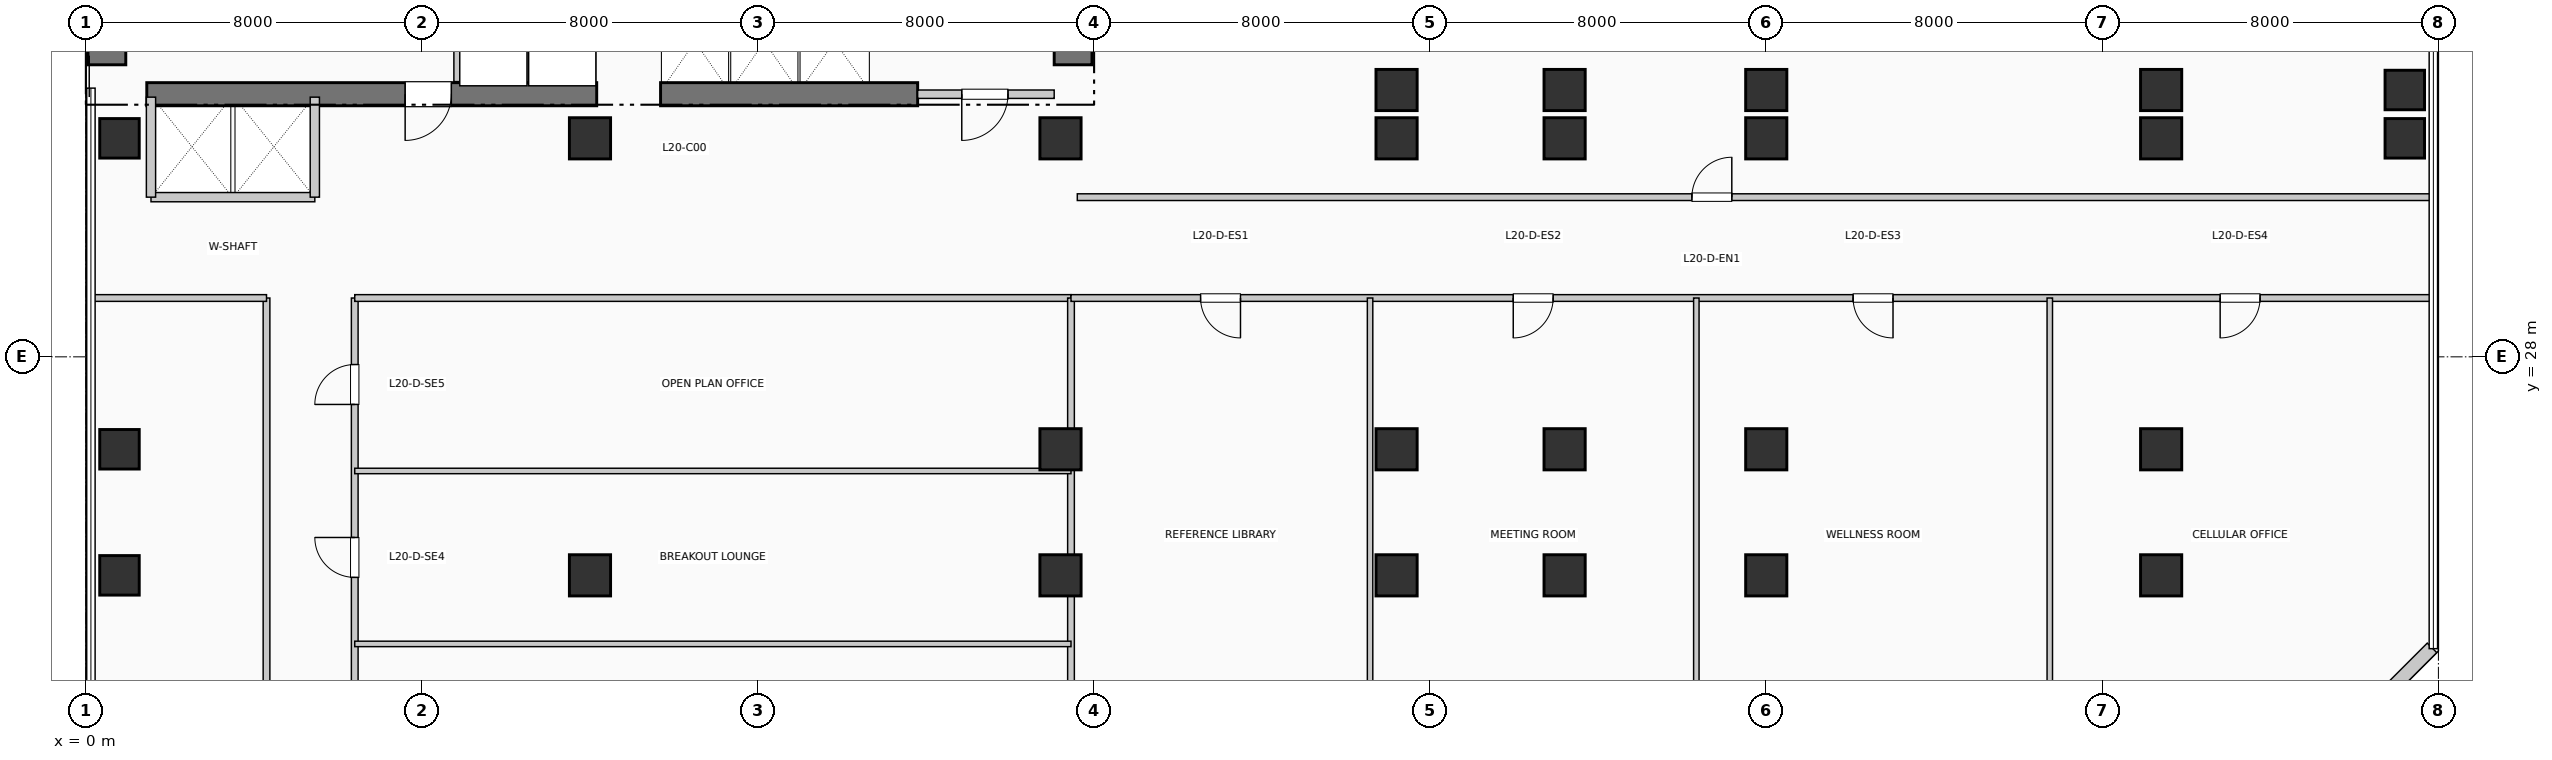
"""IFC4 building model, lengths in metres.
Left out: names, types, materials, properties, quantities, classifications, styles, units other than length and angle.
Written with IfcOpenShell. Run it as: python <this file> out.ifc"""

import sys

from ifc_helpers import new_model, si_unit, direction, frame, frame_2d, origin, origin_2d, place, context, subcontext, project, spatial, rectangle, extrude, element, fill, save


model = new_model("IFC4")
c1 = context("Model", 3, precision=1e-05, world=origin(), true_north=direction((0.0, 1.0)))
c2 = subcontext(c1, "Body", "Model", "MODEL_VIEW")
j1 = project(units=[si_unit("LENGTHUNIT", "METRE"), si_unit("PLANEANGLEUNIT", "RADIAN")], contexts=[c1])
p1 = place(None, origin())
s1 = spatial("IfcSite", under=j1, at=p1, CompositionType="ELEMENT")
p2 = place(p1, origin())
s2 = spatial("IfcBuilding", under=s1, at=p2, CompositionType="ELEMENT")
p3 = place(p2, frame((0.0, 0.0, 85.8)))
s3 = spatial("IfcBuildingStorey", under=s2, at=p3, CompositionType="ELEMENT", Elevation=85.8)
p4 = place(p3, frame((0.5, 34.95, 0.0), z_axis=(0.0, 0.0, 1.0), x_axis=(0.0, 1.0, 0.0)))
e1 = element("IfcWall", 1, at=p4, inside=s3, PredefinedType="SHEAR", context=c2, shape_type="SweptSolid", body=[
    extrude(rectangle(XDim=7.9, YDim=0.9, at=frame_2d((3.95, 0.0))), origin(), (0.0, 0.0, 1.0), 3.96),
])
p5 = place(p3, frame((23.5, 34.95, 0.0), z_axis=(0.0, 0.0, 1.0), x_axis=(0.0, 1.0, 0.0)))
e2 = element("IfcWall", 2, at=p5, inside=s3, PredefinedType="SHEAR", context=c2, shape_type="SweptSolid", body=[
    extrude(rectangle(XDim=10.64, YDim=0.9, at=frame_2d((5.32, 0.0))), origin(), (0.0, 0.0, 1.0), 3.96),
])
p6 = place(p3, frame((1.45, 34.25, 0.0), z_axis=(0.0, 0.0, 1.0), x_axis=(1.0, 0.0, 0.0)))
e3 = element("IfcWall", 3, at=p6, inside=s3, PredefinedType="SHEAR", context=c2, shape_type="SweptSolid", body=[
    extrude(rectangle(XDim=10.71, YDim=0.55, at=frame_2d((5.355, 0.0))), origin(), (0.0, 0.0, 1.0), 3.96),
])
p7 = place(p6, frame((7.25, 0.0, 0.0), z_axis=(0.0, 0.0, 1.0), x_axis=(-1.0, 0.0, 0.0)))
e4 = element("IfcOpeningElement", 4, at=p7, cuts=e3, PredefinedType="OPENING", context=c2, shape_type="SweptSolid", body=[
    extrude(rectangle(XDim=1.1, YDim=2.15, at=frame_2d((0.55, 1.075))), frame((0.0, 0.285, 0.0), z_axis=(0.0, -1.0, 0.0), x_axis=(1.0, 0.0, 0.0)), (0.0, 0.0, 1.0), 0.57),
])
p8 = place(p3, frame((13.68, 34.25, 0.0), z_axis=(0.0, 0.0, 1.0), x_axis=(1.0, 0.0, 0.0)))
e5 = element("IfcWall", 5, at=p8, inside=s3, PredefinedType="SHEAR", context=c2, shape_type="SweptSolid", body=[
    extrude(rectangle(XDim=6.12, YDim=0.55, at=frame_2d((3.06, 0.0))), origin(), (0.0, 0.0, 1.0), 3.96),
])
for number, where, z_axis, x_axis in (
    (6, (0.8, 22.8, 0.0), (0.0, 0.0, 1.0), (1.0, 0.0, 0.0)),
    (7, (0.8, 25.8, 0.0), (0.0, 0.0, 1.0), (1.0, 0.0, 0.0)),
    (8, (0.8, 33.2, 0.0), (0.0, 0.0, 1.0), (1.0, 0.0, 0.0)),
):
    element("IfcColumn", number, at=place(p3, frame(where, z_axis=z_axis, x_axis=x_axis)), inside=s3, PredefinedType="COLUMN", context=c2, shape_type="SweptSolid", body=[
        extrude(rectangle(XDim=0.94, YDim=0.94, at=origin_2d()), origin(), (0.0, 0.0, 1.0), 3.96),
    ])
for number, where, z_axis, x_axis in (
    (9, (12.0, 22.8, 0.0), (0.0, 0.0, 1.0), (1.0, 0.0, 0.0)),
    (10, (12.0, 33.2, 0.0), (0.0, 0.0, 1.0), (1.0, 0.0, 0.0)),
    (11, (23.2, 22.8, 0.0), (0.0, 0.0, 1.0), (1.0, 0.0, 0.0)),
    (12, (23.2, 25.8, 0.0), (0.0, 0.0, 1.0), (1.0, 0.0, 0.0)),
    (13, (23.2, 33.2, 0.0), (0.0, 0.0, 1.0), (1.0, 0.0, 0.0)),
    (14, (31.2, 22.8, 0.0), (0.0, 0.0, 1.0), (1.0, 0.0, 0.0)),
    (15, (31.2, 25.8, 0.0), (0.0, 0.0, 1.0), (1.0, 0.0, 0.0)),
    (16, (31.2, 33.2, 0.0), (0.0, 0.0, 1.0), (1.0, 0.0, 0.0)),
    (17, (31.2, 34.35, 0.0), (0.0, 0.0, 1.0), (1.0, 0.0, 0.0)),
    (18, (35.2, 22.8, 0.0), (0.0, 0.0, 1.0), (1.0, 0.0, 0.0)),
    (19, (35.2, 25.8, 0.0), (0.0, 0.0, 1.0), (1.0, 0.0, 0.0)),
    (20, (35.2, 33.2, 0.0), (0.0, 0.0, 1.0), (1.0, 0.0, 0.0)),
    (21, (35.2, 34.35, 0.0), (0.0, 0.0, 1.0), (1.0, 0.0, 0.0)),
    (22, (40.0, 22.8, 0.0), (0.0, 0.0, 1.0), (1.0, 0.0, 0.0)),
    (23, (40.0, 25.8, 0.0), (0.0, 0.0, 1.0), (1.0, 0.0, 0.0)),
    (24, (40.0, 33.2, 0.0), (0.0, 0.0, 1.0), (1.0, 0.0, 0.0)),
    (25, (40.0, 34.35, 0.0), (0.0, 0.0, 1.0), (1.0, 0.0, 0.0)),
    (26, (49.4, 22.8, 0.0), (0.0, 0.0, 1.0), (1.0, 0.0, 0.0)),
    (27, (49.4, 25.8, 0.0), (0.0, 0.0, 1.0), (1.0, 0.0, 0.0)),
    (28, (49.4, 33.2, 0.0), (0.0, 0.0, 1.0), (1.0, 0.0, 0.0)),
    (29, (49.4, 34.35, 0.0), (0.0, 0.0, 1.0), (1.0, 0.0, 0.0)),
):
    element("IfcColumn", number, at=place(p3, frame(where, z_axis=z_axis, x_axis=x_axis)), inside=s3, PredefinedType="COLUMN", context=c2, shape_type="SweptSolid", body=[
        extrude(rectangle(XDim=0.98, YDim=0.98, at=origin_2d()), origin(), (0.0, 0.0, 1.0), 3.96),
    ])
for number, where, z_axis, x_axis in (
    (30, (55.2, 33.2, 0.0), (0.0, 0.0, 1.0), (1.0, 0.0, 0.0)),
    (31, (55.2, 34.35, 0.0), (0.0, 0.0, 1.0), (1.0, 0.0, 0.0)),
):
    element("IfcColumn", number, at=place(p3, frame(where, z_axis=z_axis, x_axis=x_axis)), inside=s3, PredefinedType="COLUMN", context=c2, shape_type="SweptSolid", body=[
        extrude(rectangle(XDim=0.94, YDim=0.94, at=origin_2d()), origin(), (0.0, 0.0, 1.0), 3.96),
    ])
p9 = place(p3, frame((52.926, 18.152, 0.0), z_axis=(0.0, 0.0, 1.0), x_axis=(0.707106781187, 0.707106781187, 0.0)))
e32 = element("IfcWall", 32, at=p9, inside=s3, PredefinedType="SOLIDWALL", context=c2, shape_type="SweptSolid", body=[
    extrude(rectangle(XDim=4.133, YDim=0.32, at=frame_2d((2.066, 0.0))), origin(), (0.0, 0.0, 1.0), 3.71),
])
p10 = place(p3, frame((8.86, 34.55, 0.0), z_axis=(0.0, 0.0, 1.0), x_axis=(0.0, 1.0, 0.0)))
e33 = element("IfcWall", 33, at=p10, inside=s3, PredefinedType="PARTITIONING", context=c2, shape_type="SweptSolid", body=[
    extrude(rectangle(XDim=2.5, YDim=0.2, at=frame_2d((1.25, 0.0))), origin(), (0.0, 0.0, 1.0), 3.71),
])
p11 = place(p3, frame((19.8, 34.25, 0.0), z_axis=(0.0, 0.0, 1.0), x_axis=(1.0, 0.0, 0.0)))
e34 = element("IfcWall", 34, at=p11, inside=s3, PredefinedType="PARTITIONING", context=c2, shape_type="SweptSolid", body=[
    extrude(rectangle(XDim=3.25, YDim=0.2, at=frame_2d((1.625, 0.0))), origin(), (0.0, 0.0, 1.0), 3.71),
])
p12 = place(p11, frame((2.15, 0.0, 0.0), z_axis=(0.0, 0.0, 1.0), x_axis=(-1.0, 0.0, 0.0)))
e35 = element("IfcOpeningElement", 35, at=p12, cuts=e34, PredefinedType="OPENING", context=c2, shape_type="SweptSolid", body=[
    extrude(rectangle(XDim=1.1, YDim=2.15, at=frame_2d((0.55, 1.075))), frame((0.0, 0.11, 0.0), z_axis=(0.0, -1.0, 0.0), x_axis=(1.0, 0.0, 0.0)), (0.0, 0.0, 1.0), 0.22),
])
p13 = place(p3, frame((1.55, 31.8, 0.0), z_axis=(0.0, 0.0, 1.0), x_axis=(1.0, 0.0, 0.0)))
e36 = element("IfcWall", 36, at=p13, inside=s3, PredefinedType="PARTITIONING", context=c2, shape_type="SweptSolid", body=[
    extrude(rectangle(XDim=3.9, YDim=0.22, at=frame_2d((1.95, 0.0))), origin(), (0.0, 0.0, 1.0), 3.71),
])
for number, where, z_axis, x_axis in (
    (37, (1.55, 31.8, 0.0), (0.0, 0.0, 1.0), (0.0, 1.0, 0.0)),
    (38, (5.45, 31.8, 0.0), (0.0, 0.0, 1.0), (0.0, 1.0, 0.0)),
):
    element("IfcWall", number, at=place(p3, frame(where, z_axis=z_axis, x_axis=x_axis)), inside=s3, PredefinedType="PARTITIONING", context=c2, shape_type="SweptSolid", body=[
        extrude(rectangle(XDim=2.38, YDim=0.22, at=frame_2d((1.19, 0.0))), origin(), (0.0, 0.0, 1.0), 3.71),
    ])
p14 = place(p3, frame((4.3, 9.8, 0.0), z_axis=(0.0, 0.0, 1.0), x_axis=(0.0, 1.0, 0.0)))
e39 = element("IfcWall", 39, at=p14, inside=s3, PredefinedType="PARTITIONING", context=c2, shape_type="SweptSolid", body=[
    extrude(rectangle(XDim=19.6, YDim=0.16, at=frame_2d((9.8, 0.0))), origin(), (0.0, 0.0, 1.0), 3.71),
])
p15 = place(p14, frame((10.275, 0.0, 0.0), z_axis=(0.0, 0.0, 1.0), x_axis=(-1.0, 0.0, 0.0)))
e40 = element("IfcOpeningElement", 40, at=p15, cuts=e39, PredefinedType="OPENING", context=c2, shape_type="SweptSolid", body=[
    extrude(rectangle(XDim=0.95, YDim=2.15, at=frame_2d((0.475, 1.075))), frame((0.0, 0.09, 0.0), z_axis=(0.0, -1.0, 0.0), x_axis=(1.0, 0.0, 0.0)), (0.0, 0.0, 1.0), 0.18),
])
p16 = place(p3, frame((6.4, 9.8, 0.0), z_axis=(0.0, 0.0, 1.0), x_axis=(0.0, 1.0, 0.0)))
e41 = element("IfcWall", 41, at=p16, inside=s3, PredefinedType="PARTITIONING", context=c2, shape_type="SweptSolid", body=[
    extrude(rectangle(XDim=19.6, YDim=0.16, at=frame_2d((9.8, 0.0))), origin(), (0.0, 0.0, 1.0), 3.71),
])
p17 = place(p16, frame((1.387, 0.0, 0.0)))
e42 = element("IfcOpeningElement", 42, at=p17, cuts=e41, PredefinedType="OPENING", context=c2, shape_type="SweptSolid", body=[
    extrude(rectangle(XDim=0.95, YDim=2.15, at=frame_2d((0.475, 1.075))), frame((0.0, 0.09, 0.0), z_axis=(0.0, -1.0, 0.0), x_axis=(1.0, 0.0, 0.0)), (0.0, 0.0, 1.0), 0.18),
])
p18 = place(p16, frame((5.111, 0.0, 0.0)))
e43 = element("IfcOpeningElement", 43, at=p18, cuts=e41, PredefinedType="OPENING", context=c2, shape_type="SweptSolid", body=[
    extrude(rectangle(XDim=0.95, YDim=2.15, at=frame_2d((0.475, 1.075))), frame((0.0, 0.09, 0.0), z_axis=(0.0, -1.0, 0.0), x_axis=(1.0, 0.0, 0.0)), (0.0, 0.0, 1.0), 0.18),
])
p19 = place(p16, frame((8.933, 0.0, 0.0)))
e44 = element("IfcOpeningElement", 44, at=p19, cuts=e41, PredefinedType="OPENING", context=c2, shape_type="SweptSolid", body=[
    extrude(rectangle(XDim=0.95, YDim=2.15, at=frame_2d((0.475, 1.075))), frame((0.0, 0.09, 0.0), z_axis=(0.0, -1.0, 0.0), x_axis=(1.0, 0.0, 0.0)), (0.0, 0.0, 1.0), 0.18),
])
p20 = place(p16, frame((12.951, 0.0, 0.0)))
e45 = element("IfcOpeningElement", 45, at=p20, cuts=e41, PredefinedType="OPENING", context=c2, shape_type="SweptSolid", body=[
    extrude(rectangle(XDim=0.95, YDim=2.15, at=frame_2d((0.475, 1.075))), frame((0.0, 0.09, 0.0), z_axis=(0.0, -1.0, 0.0), x_axis=(1.0, 0.0, 0.0)), (0.0, 0.0, 1.0), 0.18),
])
p21 = place(p16, frame((17.067, 0.0, 0.0)))
e46 = element("IfcOpeningElement", 46, at=p21, cuts=e41, PredefinedType="OPENING", context=c2, shape_type="SweptSolid", body=[
    extrude(rectangle(XDim=0.95, YDim=2.15, at=frame_2d((0.475, 1.075))), frame((0.0, 0.09, 0.0), z_axis=(0.0, -1.0, 0.0), x_axis=(1.0, 0.0, 0.0)), (0.0, 0.0, 1.0), 0.18),
])
p22 = place(p3, frame((0.19, 29.4, 0.0), z_axis=(0.0, 0.0, 1.0), x_axis=(1.0, 0.0, 0.0)))
e47 = element("IfcWall", 47, at=p22, inside=s3, PredefinedType="PARTITIONING", context=c2, shape_type="SweptSolid", body=[
    extrude(rectangle(XDim=4.11, YDim=0.16, at=frame_2d((2.055, 0.0))), origin(), (0.0, 0.0, 1.0), 3.365),
])
p23 = place(p3, frame((6.4, 29.4, 0.0), z_axis=(0.0, 0.0, 1.0), x_axis=(1.0, 0.0, 0.0)))
e48 = element("IfcWall", 48, at=p23, inside=s3, PredefinedType="PARTITIONING", context=c2, shape_type="SweptSolid", body=[
    extrude(rectangle(XDim=17.05, YDim=0.16, at=frame_2d((8.525, 0.0))), origin(), (0.0, 0.0, 1.0), 3.365),
])
p24 = place(p3, frame((23.45, 0.19, 0.0), z_axis=(0.0, 0.0, 1.0), x_axis=(0.0, 1.0, 0.0)))
e49 = element("IfcWall", 49, at=p24, inside=s3, PredefinedType="PARTITIONING", context=c2, shape_type="SweptSolid", body=[
    extrude(rectangle(XDim=29.21, YDim=0.16, at=frame_2d((14.605, 0.0))), origin(), (0.0, 0.0, 1.0), 2.995),
])
for number, where, z_axis, x_axis in (
    (50, (6.4, 21.168, 0.0), (0.0, 0.0, 1.0), (1.0, 0.0, 0.0)),
    (51, (6.4, 25.284, 0.0), (0.0, 0.0, 1.0), (1.0, 0.0, 0.0)),
):
    element("IfcWall", number, at=place(p3, frame(where, z_axis=z_axis, x_axis=x_axis)), inside=s3, PredefinedType="PARTITIONING", context=c2, shape_type="SweptSolid", body=[
        extrude(rectangle(XDim=17.05, YDim=0.13, at=frame_2d((8.525, 0.0))), origin(), (0.0, 0.0, 1.0), 3.71),
    ])
p25 = place(p3, frame((23.45, 29.4, 0.0), z_axis=(0.0, 0.0, 1.0), x_axis=(1.0, 0.0, 0.0)))
e52 = element("IfcWall", 52, at=p25, inside=s3, PredefinedType="PARTITIONING", context=c2, shape_type="SweptSolid", body=[
    extrude(rectangle(XDim=32.36, YDim=0.16, at=frame_2d((16.18, 0.0))), origin(), (0.0, 0.0, 1.0), 3.365),
])
p26 = place(p25, frame((4.035, 0.0, 0.0), z_axis=(0.0, 0.0, 1.0), x_axis=(-1.0, 0.0, 0.0)))
e53 = element("IfcOpeningElement", 53, at=p26, cuts=e52, PredefinedType="OPENING", context=c2, shape_type="SweptSolid", body=[
    extrude(rectangle(XDim=0.95, YDim=2.15, at=frame_2d((0.475, 1.075))), frame((0.0, 0.09, 0.0), z_axis=(0.0, -1.0, 0.0), x_axis=(1.0, 0.0, 0.0)), (0.0, 0.0, 1.0), 0.18),
])
p27 = place(p25, frame((11.477, 0.0, 0.0), z_axis=(0.0, 0.0, 1.0), x_axis=(-1.0, 0.0, 0.0)))
e54 = element("IfcOpeningElement", 54, at=p27, cuts=e52, PredefinedType="OPENING", context=c2, shape_type="SweptSolid", body=[
    extrude(rectangle(XDim=0.95, YDim=2.15, at=frame_2d((0.475, 1.075))), frame((0.0, 0.09, 0.0), z_axis=(0.0, -1.0, 0.0), x_axis=(1.0, 0.0, 0.0)), (0.0, 0.0, 1.0), 0.18),
])
p28 = place(p25, frame((19.567, 0.0, 0.0), z_axis=(0.0, 0.0, 1.0), x_axis=(-1.0, 0.0, 0.0)))
e55 = element("IfcOpeningElement", 55, at=p28, cuts=e52, PredefinedType="OPENING", context=c2, shape_type="SweptSolid", body=[
    extrude(rectangle(XDim=0.95, YDim=2.15, at=frame_2d((0.475, 1.075))), frame((0.0, 0.09, 0.0), z_axis=(0.0, -1.0, 0.0), x_axis=(1.0, 0.0, 0.0)), (0.0, 0.0, 1.0), 0.18),
])
p29 = place(p25, frame((28.304, 0.0, 0.0), z_axis=(0.0, 0.0, 1.0), x_axis=(-1.0, 0.0, 0.0)))
e56 = element("IfcOpeningElement", 56, at=p29, cuts=e52, PredefinedType="OPENING", context=c2, shape_type="SweptSolid", body=[
    extrude(rectangle(XDim=0.95, YDim=2.15, at=frame_2d((0.475, 1.075))), frame((0.0, 0.09, 0.0), z_axis=(0.0, -1.0, 0.0), x_axis=(1.0, 0.0, 0.0)), (0.0, 0.0, 1.0), 0.18),
])
p30 = place(p3, frame((23.6, 31.8, 0.0), z_axis=(0.0, 0.0, 1.0), x_axis=(1.0, 0.0, 0.0)))
e57 = element("IfcWall", 57, at=p30, inside=s3, PredefinedType="PARTITIONING", context=c2, shape_type="SweptSolid", body=[
    extrude(rectangle(XDim=32.21, YDim=0.16, at=frame_2d((16.105, 0.0))), origin(), (0.0, 0.0, 1.0), 3.71),
])
p31 = place(p30, frame((14.63, 0.0, 0.0)))
e58 = element("IfcOpeningElement", 58, at=p31, cuts=e57, PredefinedType="OPENING", context=c2, shape_type="SweptSolid", body=[
    extrude(rectangle(XDim=0.95, YDim=2.15, at=frame_2d((0.475, 1.075))), frame((0.0, 0.09, 0.0), z_axis=(0.0, -1.0, 0.0), x_axis=(1.0, 0.0, 0.0)), (0.0, 0.0, 1.0), 0.18),
])
for number, where, z_axis, x_axis in (
    (59, (30.569, 18.19, 0.0), (0.0, 0.0, 1.0), (0.0, 1.0, 0.0)),
    (60, (38.336, 18.19, 0.0), (0.0, 0.0, 1.0), (0.0, 1.0, 0.0)),
    (61, (46.749, 18.19, 0.0), (0.0, 0.0, 1.0), (0.0, 1.0, 0.0)),
):
    element("IfcWall", number, at=place(p3, frame(where, z_axis=z_axis, x_axis=x_axis)), inside=s3, PredefinedType="PARTITIONING", context=c2, shape_type="SweptSolid", body=[
        extrude(rectangle(XDim=11.21, YDim=0.13, at=frame_2d((5.605, 0.0))), origin(), (0.0, 0.0, 1.0), 3.71),
    ])
p32 = place(p7, origin())
e62 = element("IfcDoor", 62, at=p32, inside=s3, OperationType="SINGLE_SWING_LEFT", PredefinedType="DOOR", context=c2, shape_type="SweptSolid", body=[
    extrude(rectangle(XDim=1.1, YDim=2.15, at=frame_2d((0.55, 1.075))), frame((0.0, 0.025, 0.0), z_axis=(0.0, -1.0, 0.0), x_axis=(1.0, 0.0, 0.0)), (0.0, 0.0, 1.0), 0.05),
])
fill(e4, e62)
p33 = place(p12, origin())
e63 = element("IfcDoor", 63, at=p33, inside=s3, OperationType="SINGLE_SWING_LEFT", PredefinedType="DOOR", context=c2, shape_type="SweptSolid", body=[
    extrude(rectangle(XDim=1.1, YDim=2.15, at=frame_2d((0.55, 1.075))), frame((0.0, 0.025, 0.0), z_axis=(0.0, -1.0, 0.0), x_axis=(1.0, 0.0, 0.0)), (0.0, 0.0, 1.0), 0.05),
])
fill(e35, e63)
p34 = place(p20, origin())
e64 = element("IfcDoor", 64, at=p34, inside=s3, OperationType="SINGLE_SWING_RIGHT", PredefinedType="DOOR", context=c2, shape_type="SweptSolid", body=[
    extrude(rectangle(XDim=0.95, YDim=2.15, at=frame_2d((0.475, 1.075))), frame((0.0, 0.025, 0.0), z_axis=(0.0, -1.0, 0.0), x_axis=(1.0, 0.0, 0.0)), (0.0, 0.0, 1.0), 0.05),
])
fill(e45, e64)
p35 = place(p21, origin())
e65 = element("IfcDoor", 65, at=p35, inside=s3, OperationType="SINGLE_SWING_LEFT", PredefinedType="DOOR", context=c2, shape_type="SweptSolid", body=[
    extrude(rectangle(XDim=0.95, YDim=2.15, at=frame_2d((0.475, 1.075))), frame((0.0, 0.025, 0.0), z_axis=(0.0, -1.0, 0.0), x_axis=(1.0, 0.0, 0.0)), (0.0, 0.0, 1.0), 0.05),
])
fill(e46, e65)
p36 = place(p26, origin())
e66 = element("IfcDoor", 66, at=p36, inside=s3, OperationType="SINGLE_SWING_RIGHT", PredefinedType="DOOR", context=c2, shape_type="SweptSolid", body=[
    extrude(rectangle(XDim=0.95, YDim=2.15, at=frame_2d((0.475, 1.075))), frame((0.0, 0.025, 0.0), z_axis=(0.0, -1.0, 0.0), x_axis=(1.0, 0.0, 0.0)), (0.0, 0.0, 1.0), 0.05),
])
fill(e53, e66)
p37 = place(p27, origin())
e67 = element("IfcDoor", 67, at=p37, inside=s3, OperationType="SINGLE_SWING_LEFT", PredefinedType="DOOR", context=c2, shape_type="SweptSolid", body=[
    extrude(rectangle(XDim=0.95, YDim=2.15, at=frame_2d((0.475, 1.075))), frame((0.0, 0.025, 0.0), z_axis=(0.0, -1.0, 0.0), x_axis=(1.0, 0.0, 0.0)), (0.0, 0.0, 1.0), 0.05),
])
fill(e54, e67)
p38 = place(p28, origin())
e68 = element("IfcDoor", 68, at=p38, inside=s3, OperationType="SINGLE_SWING_RIGHT", PredefinedType="DOOR", context=c2, shape_type="SweptSolid", body=[
    extrude(rectangle(XDim=0.95, YDim=2.15, at=frame_2d((0.475, 1.075))), frame((0.0, 0.025, 0.0), z_axis=(0.0, -1.0, 0.0), x_axis=(1.0, 0.0, 0.0)), (0.0, 0.0, 1.0), 0.05),
])
fill(e55, e68)
p39 = place(p29, origin())
e69 = element("IfcDoor", 69, at=p39, inside=s3, OperationType="SINGLE_SWING_LEFT", PredefinedType="DOOR", context=c2, shape_type="SweptSolid", body=[
    extrude(rectangle(XDim=0.95, YDim=2.15, at=frame_2d((0.475, 1.075))), frame((0.0, 0.025, 0.0), z_axis=(0.0, -1.0, 0.0), x_axis=(1.0, 0.0, 0.0)), (0.0, 0.0, 1.0), 0.05),
])
fill(e56, e69)
p40 = place(p31, origin())
e70 = element("IfcDoor", 70, at=p40, inside=s3, OperationType="SINGLE_SWING_RIGHT", PredefinedType="DOOR", context=c2, shape_type="SweptSolid", body=[
    extrude(rectangle(XDim=0.95, YDim=2.15, at=frame_2d((0.475, 1.075))), frame((0.0, 0.025, 0.0), z_axis=(0.0, -1.0, 0.0), x_axis=(1.0, 0.0, 0.0)), (0.0, 0.0, 1.0), 0.05),
])
fill(e58, e70)
save(model, sys.argv[1])
